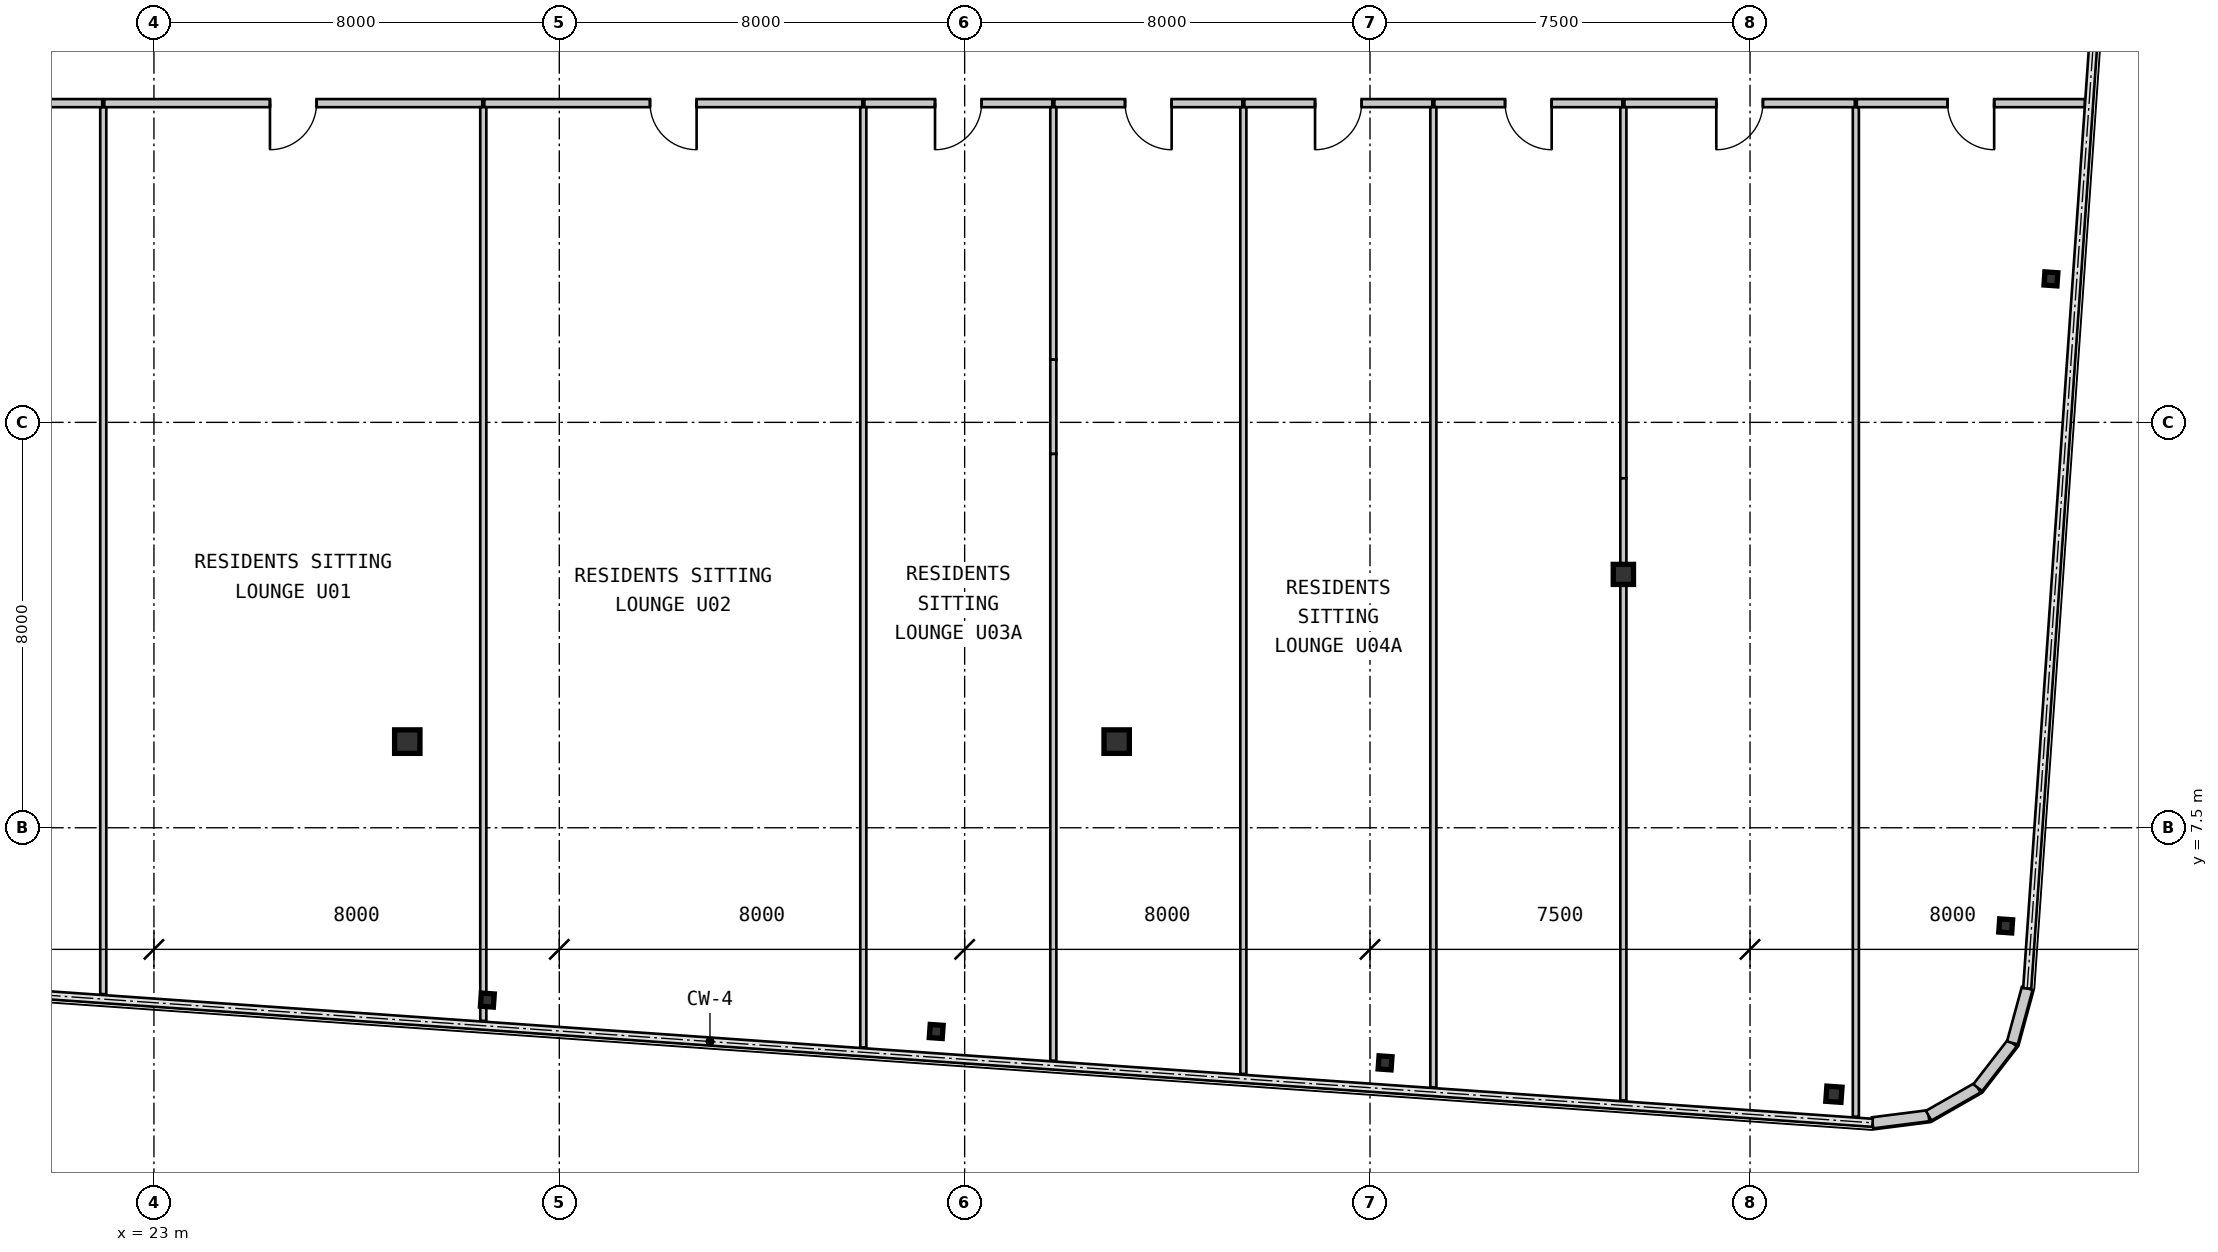
"""IFC4 building model, lengths in metres.
Left out: names, types, materials, properties, quantities, classifications, styles, units other than length and angle.
Written with IfcOpenShell. Run it as: python <this file> out.ifc"""

import sys

from ifc_helpers import new_model, si_unit, direction, frame, frame_2d, origin, origin_2d, place, context, subcontext, project, spatial, rectangle, hollow_rectangle, i_section, extrude, source, transform, mapped, element, fill, save


model = new_model("IFC4")
c1 = context("Model", 3, precision=1e-05, world=origin(), true_north=direction((0.0, 1.0)))
c2 = subcontext(c1, "Body", "Model", "MODEL_VIEW")
j1 = project(units=[si_unit("LENGTHUNIT", "METRE"), si_unit("PLANEANGLEUNIT", "RADIAN")], contexts=[c1])
p1 = place(None, origin())
s1 = spatial("IfcSite", under=j1, at=p1, CompositionType="ELEMENT")
p2 = place(p1, origin())
s2 = spatial("IfcBuilding", under=s1, at=p2, CompositionType="ELEMENT")
p3 = place(p2, frame((0.0, 0.0, 133.0)))
s3 = spatial("IfcBuildingStorey", under=s2, at=p3, CompositionType="ELEMENT", Elevation=133.0)
m1 = source(origin(), c2, "Body", "SweptSolid", [
    extrude(i_section(OverallWidth=0.5, OverallDepth=0.464, WebThickness=0.022, FlangeThickness=0.034, at=origin_2d()), origin(), (0.0, 0.0, 1.0), 3.15),
])
for number, where, z_axis, x_axis in (
    (1, (28.0, 9.2, 0.0), (0.0, 0.0, 1.0), (1.0, 0.0, 0.0)),
    (2, (42.0, 9.2, 0.0), (0.0, 0.0, 1.0), (1.0, 0.0, 0.0)),
):
    element("IfcColumn", number, at=place(p3, frame(where, z_axis=z_axis, x_axis=x_axis)), inside=s3, PredefinedType="COLUMN", context=c2, shape_type="MappedRepresentation", body=[
        mapped(m1, transform((0.0, 0.0, 0.0), scale=1.0)),
    ])
m2 = source(origin(), c2, "Body", "SweptSolid", [
    extrude(i_section(OverallWidth=0.4, OverallDepth=0.396, WebThickness=0.022, FlangeThickness=0.034, at=origin_2d()), origin(), (0.0, 0.0, 1.0), 3.15),
])
p4 = place(p3, frame((52.0, 12.5, 0.0), z_axis=(0.0, 0.0, 1.0), x_axis=(1.0, 0.0, 0.0)))
e3 = element("IfcColumn", 3, at=p4, inside=s3, PredefinedType="COLUMN", context=c2, shape_type="MappedRepresentation", body=[
    mapped(m2, transform((0.0, 0.0, 0.0), scale=1.0)),
])
m3 = source(origin(), c2, "Body", "SweptSolid", [
    extrude(i_section(OverallWidth=0.256, OverallDepth=0.26, WebThickness=0.01, FlangeThickness=0.017, at=origin_2d()), origin(), (0.0, 0.0, 1.0), 3.15),
])
for number, where, z_axis, x_axis in (
    (4, (29.58, 4.1, 0.0), (0.0, 0.0, 1.0), (0.998, -0.07, 0.0)),
    (5, (38.439, 3.48, 0.0), (0.0, 0.0, 1.0), (0.998, -0.07, 0.0)),
    (6, (47.297, 2.861, 0.0), (0.0, 0.0, 1.0), (0.998, -0.07, 0.0)),
):
    element("IfcColumn", number, at=place(p3, frame(where, z_axis=z_axis, x_axis=x_axis)), inside=s3, PredefinedType="COLUMN", context=c2, shape_type="MappedRepresentation", body=[
        mapped(m3, transform((0.0, 0.0, 0.0), scale=1.0)),
    ])
m4 = source(origin(), c2, "Body", "SweptSolid", [
    extrude(hollow_rectangle(XDim=0.3, YDim=0.3, WallThickness=0.012, at=origin_2d()), origin(), (0.0, 0.0, 1.0), 3.15),
])
p5 = place(p3, frame((56.156, 2.241, 0.0), z_axis=(0.0, 0.0, 1.0), x_axis=(0.99756405026, -0.069756473744, 0.0)))
e7 = element("IfcColumn", 7, at=p5, inside=s3, PredefinedType="COLUMN", context=c2, shape_type="MappedRepresentation", body=[
    mapped(m4, transform((0.0, 0.0, 0.0), scale=1.0)),
])
for number, where, z_axis, x_axis in (
    (8, (59.545, 5.563, 0.0), (0.0, 0.0, 1.0), (0.998, -0.07, 0.0)),
    (9, (60.438, 18.332, 0.0), (0.0, 0.0, 1.0), (0.998, -0.07, 0.0)),
):
    element("IfcColumn", number, at=place(p3, frame(where, z_axis=z_axis, x_axis=x_axis)), inside=s3, PredefinedType="COLUMN", context=c2, shape_type="MappedRepresentation", body=[
        mapped(m3, transform((0.0, 0.0, 0.0), scale=1.0)),
    ])
m5 = source(origin(), c2, "Body", "SweptSolid", [
    extrude(rectangle(XDim=1.116, YDim=0.22, at=frame_2d((0.558, 0.0))), origin(), (0.0, 0.0, 1.0), 2.93),
])
p6 = place(p3, frame((56.918, 1.677, 0.0), z_axis=(0.0, 0.0, 1.0), x_axis=(0.99202678349, 0.126027222605, 0.0)))
e10 = element("IfcWall", 10, at=p6, inside=s3, PredefinedType="SOLIDWALL", context=c2, shape_type="MappedRepresentation", body=[
    mapped(m5, transform((0.0, 0.0, 0.0), scale=1.0)),
])
m6 = source(origin(), c2, "Body", "SweptSolid", [
    extrude(rectangle(XDim=1.116, YDim=0.22, at=frame_2d((0.558, 0.0))), origin(), (0.0, 0.0, 1.0), 2.93),
])
for number, where, z_axis, x_axis in (
    (11, (58.025, 1.817, 0.0), (0.0, 0.0, 1.0), (0.868, 0.496, 0.0)),
    (12, (58.994, 2.371, 0.0), (0.0, 0.0, 1.0), (0.612, 0.791, 0.0)),
    (13, (59.677, 3.254, 0.0), (0.0, 0.0, 1.0), (0.263, 0.965, 0.0)),
):
    element("IfcWall", number, at=place(p3, frame(where, z_axis=z_axis, x_axis=x_axis)), inside=s3, PredefinedType="SOLIDWALL", context=c2, shape_type="MappedRepresentation", body=[
        mapped(m6, transform((0.0, 0.0, 0.0), scale=1.0)),
    ])
m7 = source(origin(), c2, "Body", "SweptSolid", [
    extrude(rectangle(XDim=6.765, YDim=0.16, at=frame_2d((3.383, 0.0))), origin(), (0.0, 0.0, 1.0), 2.93),
])
p7 = place(p3, frame((21.979, 21.8, 0.0), z_axis=(0.0, 0.0, 1.0), x_axis=(-1.0, 0.0, 0.0)))
e14 = element("IfcWall", 14, at=p7, inside=s3, PredefinedType="PARTITIONING", context=c2, shape_type="MappedRepresentation", body=[
    mapped(m7, transform((0.0, 0.0, 0.0), scale=1.0)),
])
m8 = source(origin(), c2, "Body", "SweptSolid", [
    extrude(rectangle(XDim=0.92, YDim=2.1, at=frame_2d((0.46, 1.05))), frame((0.0, 0.09, 0.0), z_axis=(0.0, -1.0, 0.0), x_axis=(1.0, 0.0, 0.0)), (0.0, 0.0, 1.0), 0.18),
])
p8 = place(p7, frame((2.923, 0.0, 0.0)))
e15 = element("IfcOpeningElement", 15, at=p8, cuts=e14, PredefinedType="OPENING", context=c2, shape_type="MappedRepresentation", body=[
    mapped(m8, transform((0.0, 0.0, 0.0), scale=1.0)),
])
m9 = source(origin(), c2, "Body", "SweptSolid", [
    extrude(rectangle(XDim=7.459, YDim=0.16, at=frame_2d((3.73, 0.0))), origin(), (0.0, 0.0, 1.0), 2.93),
])
p9 = place(p3, frame((29.48, 21.8, 0.0), z_axis=(0.0, 0.0, 1.0), x_axis=(-1.0, 0.0, 0.0)))
e16 = element("IfcWall", 16, at=p9, inside=s3, PredefinedType="PARTITIONING", context=c2, shape_type="MappedRepresentation", body=[
    mapped(m9, transform((0.0, 0.0, 0.0), scale=1.0)),
])
p10 = place(p9, frame((3.27, 0.0, 0.0)))
e17 = element("IfcOpeningElement", 17, at=p10, cuts=e16, PredefinedType="OPENING", context=c2, shape_type="MappedRepresentation", body=[
    mapped(m8, transform((0.0, 0.0, 0.0), scale=1.0)),
])
p11 = place(p3, frame((36.98, 21.8, 0.0), z_axis=(0.0, 0.0, 1.0), x_axis=(-1.0, 0.0, 0.0)))
e18 = element("IfcWall", 18, at=p11, inside=s3, PredefinedType="PARTITIONING", context=c2, shape_type="MappedRepresentation", body=[
    mapped(m9, transform((0.0, 0.0, 0.0), scale=1.0)),
])
p12 = place(p11, frame((3.27, 0.0, 0.0)))
e19 = element("IfcOpeningElement", 19, at=p12, cuts=e18, PredefinedType="OPENING", context=c2, shape_type="MappedRepresentation", body=[
    mapped(m8, transform((0.0, 0.0, 0.0), scale=1.0)),
])
m10 = source(origin(), c2, "Body", "SweptSolid", [
    extrude(rectangle(XDim=3.709, YDim=0.16, at=frame_2d((1.855, 0.0))), origin(), (0.0, 0.0, 1.0), 2.93),
])
p13 = place(p3, frame((40.73, 21.8, 0.0), z_axis=(0.0, 0.0, 1.0), x_axis=(-1.0, 0.0, 0.0)))
e20 = element("IfcWall", 20, at=p13, inside=s3, PredefinedType="PARTITIONING", context=c2, shape_type="MappedRepresentation", body=[
    mapped(m10, transform((0.0, 0.0, 0.0), scale=1.0)),
])
p14 = place(p13, frame((1.395, 0.0, 0.0)))
e21 = element("IfcOpeningElement", 21, at=p14, cuts=e20, PredefinedType="OPENING", context=c2, shape_type="MappedRepresentation", body=[
    mapped(m8, transform((0.0, 0.0, 0.0), scale=1.0)),
])
p15 = place(p3, frame((44.48, 21.8, 0.0), z_axis=(0.0, 0.0, 1.0), x_axis=(-1.0, 0.0, 0.0)))
e22 = element("IfcWall", 22, at=p15, inside=s3, PredefinedType="PARTITIONING", context=c2, shape_type="MappedRepresentation", body=[
    mapped(m10, transform((0.0, 0.0, 0.0), scale=1.0)),
])
p16 = place(p15, frame((1.395, 0.0, 0.0)))
e23 = element("IfcOpeningElement", 23, at=p16, cuts=e22, PredefinedType="OPENING", context=c2, shape_type="MappedRepresentation", body=[
    mapped(m8, transform((0.0, 0.0, 0.0), scale=1.0)),
])
p17 = place(p3, frame((48.23, 21.8, 0.0), z_axis=(0.0, 0.0, 1.0), x_axis=(-1.0, 0.0, 0.0)))
e24 = element("IfcWall", 24, at=p17, inside=s3, PredefinedType="PARTITIONING", context=c2, shape_type="MappedRepresentation", body=[
    mapped(m10, transform((0.0, 0.0, 0.0), scale=1.0)),
])
p18 = place(p17, frame((1.395, 0.0, 0.0)))
e25 = element("IfcOpeningElement", 25, at=p18, cuts=e24, PredefinedType="OPENING", context=c2, shape_type="MappedRepresentation", body=[
    mapped(m8, transform((0.0, 0.0, 0.0), scale=1.0)),
])
p19 = place(p3, frame((51.98, 21.8, 0.0), z_axis=(0.0, 0.0, 1.0), x_axis=(-1.0, 0.0, 0.0)))
e26 = element("IfcWall", 26, at=p19, inside=s3, PredefinedType="PARTITIONING", context=c2, shape_type="MappedRepresentation", body=[
    mapped(m10, transform((0.0, 0.0, 0.0), scale=1.0)),
])
p20 = place(p19, frame((1.395, 0.0, 0.0)))
e27 = element("IfcOpeningElement", 27, at=p20, cuts=e26, PredefinedType="OPENING", context=c2, shape_type="MappedRepresentation", body=[
    mapped(m8, transform((0.0, 0.0, 0.0), scale=1.0)),
])
m11 = source(origin(), c2, "Body", "SweptSolid", [
    extrude(rectangle(XDim=4.547, YDim=0.16, at=frame_2d((2.274, 0.0))), origin(), (0.0, 0.0, 1.0), 2.93),
])
p21 = place(p3, frame((56.568, 21.8, 0.0), z_axis=(0.0, 0.0, 1.0), x_axis=(-1.0, 0.0, 0.0)))
e28 = element("IfcWall", 28, at=p21, inside=s3, PredefinedType="PARTITIONING", context=c2, shape_type="MappedRepresentation", body=[
    mapped(m11, transform((0.0, 0.0, 0.0), scale=1.0)),
])
p22 = place(p21, frame((1.814, 0.0, 0.0)))
e29 = element("IfcOpeningElement", 29, at=p22, cuts=e28, PredefinedType="OPENING", context=c2, shape_type="MappedRepresentation", body=[
    mapped(m8, transform((0.0, 0.0, 0.0), scale=1.0)),
])
m12 = source(origin(), c2, "Body", "SweptSolid", [
    extrude(rectangle(XDim=4.499, YDim=0.16, at=frame_2d((2.25, 0.0))), origin(), (0.0, 0.0, 1.0), 2.93),
])
p23 = place(p3, frame((61.107, 21.8, 0.0), z_axis=(0.0, 0.0, 1.0), x_axis=(-1.0, 0.0, 0.0)))
e30 = element("IfcWall", 30, at=p23, inside=s3, PredefinedType="PARTITIONING", context=c2, shape_type="MappedRepresentation", body=[
    mapped(m12, transform((0.0, 0.0, 0.0), scale=1.0)),
])
p24 = place(p23, frame((1.79, 0.0, 0.0)))
e31 = element("IfcOpeningElement", 31, at=p24, cuts=e30, PredefinedType="OPENING", context=c2, shape_type="MappedRepresentation", body=[
    mapped(m8, transform((0.0, 0.0, 0.0), scale=1.0)),
])
m13 = source(origin(), c2, "Body", "SweptSolid", [
    extrude(rectangle(XDim=17.5, YDim=0.12, at=frame_2d((8.75, 0.0))), origin(), (0.0, 0.0, 1.0), 2.93),
])
p25 = place(p3, frame((22.0, 21.717, 0.0), z_axis=(0.0, 0.0, 1.0), x_axis=(0.0, -1.0, 0.0)))
e32 = element("IfcWall", 32, at=p25, inside=s3, PredefinedType="PARTITIONING", context=c2, shape_type="MappedRepresentation", body=[
    mapped(m13, transform((0.0, 0.0, 0.0), scale=1.0)),
])
m14 = source(origin(), c2, "Body", "SweptSolid", [
    extrude(rectangle(XDim=18.03, YDim=0.12, at=frame_2d((9.015, 0.0))), origin(), (0.0, 0.0, 1.0), 2.93),
])
p26 = place(p3, frame((29.5, 21.72, 0.0), z_axis=(0.0, 0.0, 1.0), x_axis=(0.0, -1.0, 0.0)))
e33 = element("IfcWall", 33, at=p26, inside=s3, PredefinedType="PARTITIONING", context=c2, shape_type="MappedRepresentation", body=[
    mapped(m14, transform((0.0, 0.0, 0.0), scale=1.0)),
])
m15 = source(origin(), c2, "Body", "SweptSolid", [
    extrude(rectangle(XDim=18.555, YDim=0.12, at=frame_2d((9.277, 0.0))), origin(), (0.0, 0.0, 1.0), 2.93),
])
p27 = place(p3, frame((37.0, 21.72, 0.0), z_axis=(0.0, 0.0, 1.0), x_axis=(0.0, -1.0, 0.0)))
e34 = element("IfcWall", 34, at=p27, inside=s3, PredefinedType="PARTITIONING", context=c2, shape_type="MappedRepresentation", body=[
    mapped(m15, transform((0.0, 0.0, 0.0), scale=1.0)),
])
m16 = source(origin(), c2, "Body", "SweptSolid", [
    extrude(rectangle(XDim=4.982, YDim=0.12, at=frame_2d((2.491, 0.0))), origin(), (0.0, 0.0, 1.0), 2.93),
])
p28 = place(p3, frame((40.75, 21.72, 0.0), z_axis=(0.0, 0.0, 1.0), x_axis=(0.0, -1.0, 0.0)))
e35 = element("IfcWall", 35, at=p28, inside=s3, PredefinedType="PARTITIONING", context=c2, shape_type="MappedRepresentation", body=[
    mapped(m16, transform((0.0, 0.0, 0.0), scale=1.0)),
])
m17 = source(origin(), c2, "Body", "SweptSolid", [
    extrude(rectangle(XDim=1.861, YDim=0.12, at=frame_2d((0.93, 0.0))), origin(), (0.0, 0.0, 1.0), 2.328),
])
p29 = place(p3, frame((40.75, 16.738, 0.0), z_axis=(0.0, 0.0, 1.0), x_axis=(0.0, -1.0, 0.0)))
e36 = element("IfcWall", 36, at=p29, inside=s3, PredefinedType="PARTITIONING", context=c2, shape_type="MappedRepresentation", body=[
    mapped(m17, transform((0.0, 0.0, 0.0), scale=1.0)),
])
m18 = source(origin(), c2, "Body", "SweptSolid", [
    extrude(rectangle(XDim=11.974, YDim=0.12, at=frame_2d((5.987, 0.0))), origin(), (0.0, 0.0, 1.0), 2.93),
])
p30 = place(p3, frame((40.75, 14.877, 0.0), z_axis=(0.0, 0.0, 1.0), x_axis=(0.0, -1.0, 0.0)))
e37 = element("IfcWall", 37, at=p30, inside=s3, PredefinedType="PARTITIONING", context=c2, shape_type="MappedRepresentation", body=[
    mapped(m18, transform((0.0, 0.0, 0.0), scale=1.0)),
])
m19 = source(origin(), c2, "Body", "SweptSolid", [
    extrude(rectangle(XDim=19.075, YDim=0.12, at=frame_2d((9.538, 0.0))), origin(), (0.0, 0.0, 1.0), 2.93),
])
p31 = place(p3, frame((44.5, 21.718, 0.0), z_axis=(0.0, 0.0, 1.0), x_axis=(0.0, -1.0, 0.0)))
e38 = element("IfcWall", 38, at=p31, inside=s3, PredefinedType="PARTITIONING", context=c2, shape_type="MappedRepresentation", body=[
    mapped(m19, transform((0.0, 0.0, 0.0), scale=1.0)),
])
m20 = source(origin(), c2, "Body", "SweptSolid", [
    extrude(rectangle(XDim=19.341, YDim=0.12, at=frame_2d((9.671, 0.0))), origin(), (0.0, 0.0, 1.0), 2.93),
])
p32 = place(p3, frame((48.25, 21.72, 0.0), z_axis=(0.0, 0.0, 1.0), x_axis=(0.0, -1.0, 0.0)))
e39 = element("IfcWall", 39, at=p32, inside=s3, PredefinedType="PARTITIONING", context=c2, shape_type="MappedRepresentation", body=[
    mapped(m20, transform((0.0, 0.0, 0.0), scale=1.0)),
])
m21 = source(origin(), c2, "Body", "SweptSolid", [
    extrude(rectangle(XDim=7.322, YDim=0.12, at=frame_2d((3.661, 0.0))), origin(), (0.0, 0.0, 1.0), 2.93),
])
p33 = place(p3, frame((52.0, 21.718, 0.0), z_axis=(0.0, 0.0, 1.0), x_axis=(0.0, -1.0, 0.0)))
e40 = element("IfcWall", 40, at=p33, inside=s3, PredefinedType="PARTITIONING", context=c2, shape_type="MappedRepresentation", body=[
    mapped(m21, transform((0.0, 0.0, 0.0), scale=1.0)),
])
m22 = source(origin(), c2, "Body", "SweptSolid", [
    extrude(rectangle(XDim=1.901, YDim=0.12, at=frame_2d((0.951, 0.0))), origin(), (0.0, 0.0, 1.0), 2.397),
])
p34 = place(p3, frame((52.0, 14.396, 0.0), z_axis=(0.0, 0.0, 1.0), x_axis=(0.0, -1.0, 0.0)))
e41 = element("IfcWall", 41, at=p34, inside=s3, PredefinedType="PARTITIONING", context=c2, shape_type="MappedRepresentation", body=[
    mapped(m22, transform((0.0, 0.0, 0.0), scale=1.0)),
])
m23 = source(origin(), c2, "Body", "SweptSolid", [
    extrude(rectangle(XDim=10.376, YDim=0.12, at=frame_2d((5.188, 0.0))), origin(), (0.0, 0.0, 1.0), 2.93),
])
p35 = place(p3, frame((52.0, 12.495, 0.0), z_axis=(0.0, 0.0, 1.0), x_axis=(0.0, -1.0, 0.0)))
e42 = element("IfcWall", 42, at=p35, inside=s3, PredefinedType="PARTITIONING", context=c2, shape_type="MappedRepresentation", body=[
    mapped(m23, transform((0.0, 0.0, 0.0), scale=1.0)),
])
m24 = source(origin(), c2, "Body", "SweptSolid", [
    extrude(rectangle(XDim=19.92, YDim=0.12, at=frame_2d((9.96, 0.0))), origin(), (0.0, 0.0, 1.0), 2.93),
])
p36 = place(p3, frame((56.588, 21.718, 0.0), z_axis=(0.0, 0.0, 1.0), x_axis=(0.0, -1.0, 0.0)))
e43 = element("IfcWall", 43, at=p36, inside=s3, PredefinedType="PARTITIONING", context=c2, shape_type="MappedRepresentation", body=[
    mapped(m24, transform((0.0, 0.0, 0.0), scale=1.0)),
])
m25 = source(origin(), c2, "Body", "SweptSolid", [
    extrude(rectangle(XDim=0.92, YDim=2.1, at=frame_2d((0.46, 1.05))), frame((0.0, 0.025, 0.0), z_axis=(0.0, -1.0, 0.0), x_axis=(1.0, 0.0, 0.0)), (0.0, 0.0, 1.0), 0.05),
])
p37 = place(p10, origin())
e44 = element("IfcDoor", 44, at=p37, inside=s3, OperationType="SINGLE_SWING_RIGHT", PredefinedType="DOOR", context=c2, shape_type="MappedRepresentation", body=[
    mapped(m25, transform((0.0, 0.0, 0.0), scale=1.0)),
])
fill(e17, e44)
p38 = place(p12, origin())
e45 = element("IfcDoor", 45, at=p38, inside=s3, OperationType="SINGLE_SWING_LEFT", PredefinedType="DOOR", context=c2, shape_type="MappedRepresentation", body=[
    mapped(m25, transform((0.0, 0.0, 0.0), scale=1.0)),
])
fill(e19, e45)
p39 = place(p14, origin())
e46 = element("IfcDoor", 46, at=p39, inside=s3, OperationType="SINGLE_SWING_RIGHT", PredefinedType="DOOR", context=c2, shape_type="MappedRepresentation", body=[
    mapped(m25, transform((0.0, 0.0, 0.0), scale=1.0)),
])
fill(e21, e46)
p40 = place(p16, origin())
e47 = element("IfcDoor", 47, at=p40, inside=s3, OperationType="SINGLE_SWING_LEFT", PredefinedType="DOOR", context=c2, shape_type="MappedRepresentation", body=[
    mapped(m25, transform((0.0, 0.0, 0.0), scale=1.0)),
])
fill(e23, e47)
p41 = place(p18, origin())
e48 = element("IfcDoor", 48, at=p41, inside=s3, OperationType="SINGLE_SWING_RIGHT", PredefinedType="DOOR", context=c2, shape_type="MappedRepresentation", body=[
    mapped(m25, transform((0.0, 0.0, 0.0), scale=1.0)),
])
fill(e25, e48)
p42 = place(p20, origin())
e49 = element("IfcDoor", 49, at=p42, inside=s3, OperationType="SINGLE_SWING_LEFT", PredefinedType="DOOR", context=c2, shape_type="MappedRepresentation", body=[
    mapped(m25, transform((0.0, 0.0, 0.0), scale=1.0)),
])
fill(e27, e49)
p43 = place(p22, origin())
e50 = element("IfcDoor", 50, at=p43, inside=s3, OperationType="SINGLE_SWING_RIGHT", PredefinedType="DOOR", context=c2, shape_type="MappedRepresentation", body=[
    mapped(m25, transform((0.0, 0.0, 0.0), scale=1.0)),
])
fill(e29, e50)
p44 = place(p24, origin())
e51 = element("IfcDoor", 51, at=p44, inside=s3, OperationType="SINGLE_SWING_LEFT", PredefinedType="DOOR", context=c2, shape_type="MappedRepresentation", body=[
    mapped(m25, transform((0.0, 0.0, 0.0), scale=1.0)),
])
fill(e31, e51)
save(model, sys.argv[1])
